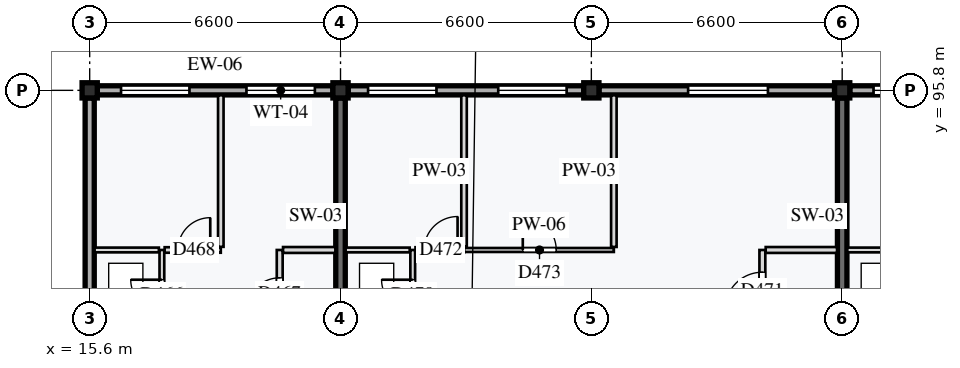
"""IFC4 building model, lengths in metres.
Left out: names, types, materials, properties, quantities, classifications, styles, units other than length and angle.
Written with IfcOpenShell. Run it as: python <this file> out.ifc"""

import sys

from ifc_helpers import new_model, si_unit, direction, frame, frame_2d, origin, origin_2d, place, context, subcontext, project, spatial, rectangle, extrude, element, fill, save


model = new_model("IFC4")
c1 = context("Model", 3, precision=1e-05, world=origin(), true_north=direction((0.0, 1.0)))
c2 = subcontext(c1, "Body", "Model", "MODEL_VIEW")
j1 = project(units=[si_unit("LENGTHUNIT", "METRE"), si_unit("PLANEANGLEUNIT", "RADIAN")], contexts=[c1])
p1 = place(None, origin())
s1 = spatial("IfcSite", under=j1, at=p1, CompositionType="ELEMENT")
p2 = place(p1, origin())
s2 = spatial("IfcBuilding", under=s1, at=p2, CompositionType="ELEMENT")
p3 = place(p2, frame((0.0, 0.0, 46.8)))
s3 = spatial("IfcBuildingStorey", under=s2, at=p3, CompositionType="ELEMENT", Elevation=46.8)
for number, where, z_axis, x_axis in (
    (1, (15.6, 95.8, 0.0), (0.0, 0.0, 1.0), (1.0, 0.0, 0.0)),
    (2, (22.2, 95.8, 0.0), (0.0, 0.0, 1.0), (1.0, 0.0, 0.0)),
    (3, (28.8, 95.8, 0.0), (0.0, 0.0, 1.0), (1.0, 0.0, 0.0)),
    (4, (35.4, 95.8, 0.0), (0.0, 0.0, 1.0), (1.0, 0.0, 0.0)),
):
    element("IfcColumn", number, at=place(p3, frame(where, z_axis=z_axis, x_axis=x_axis)), inside=s3, PredefinedType="COLUMN", context=c2, shape_type="SweptSolid", body=[
        extrude(rectangle(XDim=0.4, YDim=0.4, at=origin_2d()), origin(), (0.0, 0.0, 1.0), 3.2),
    ])
for number, where, z_axis, x_axis in (
    (5, (22.2, 89.4, 0.0), (0.0, 0.0, 1.0), (0.0, 1.0, 0.0)),
    (6, (35.4, 89.4, 0.0), (0.0, 0.0, 1.0), (0.0, 1.0, 0.0)),
):
    element("IfcWall", number, at=place(p3, frame(where, z_axis=z_axis, x_axis=x_axis)), inside=s3, PredefinedType="SHEAR", context=c2, shape_type="SweptSolid", body=[
        extrude(rectangle(XDim=6.2, YDim=0.25, at=frame_2d((3.1, 0.0))), origin(), (0.0, 0.0, 1.0), 2.98),
    ])
p4 = place(p3, frame((15.8, 95.8, 0.0), z_axis=(0.0, 0.0, 1.0), x_axis=(1.0, 0.0, 0.0)))
e7 = element("IfcWall", 7, at=p4, inside=s3, PredefinedType="STANDARD", context=c2, shape_type="SweptSolid", body=[
    extrude(rectangle(XDim=6.2, YDim=0.24, at=frame_2d((3.1, 0.0))), origin(), (0.0, 0.0, 1.0), 2.65),
])
p5 = place(p4, frame((0.625, 0.0, 0.85)))
e8 = element("IfcOpeningElement", 8, at=p5, cuts=e7, PredefinedType="OPENING", context=c2, shape_type="SweptSolid", body=[
    extrude(rectangle(XDim=1.8, YDim=1.35, at=frame_2d((0.9, 0.675))), frame((0.0, 0.13, 0.0), z_axis=(0.0, -1.0, 0.0), x_axis=(1.0, 0.0, 0.0)), (0.0, 0.0, 1.0), 0.26),
])
p6 = place(p4, frame((3.925, 0.0, 0.85)))
e9 = element("IfcOpeningElement", 9, at=p6, cuts=e7, PredefinedType="OPENING", context=c2, shape_type="SweptSolid", body=[
    extrude(rectangle(XDim=1.8, YDim=1.55, at=frame_2d((0.9, 0.775))), frame((0.0, 0.13, 0.0), z_axis=(0.0, -1.0, 0.0), x_axis=(1.0, 0.0, 0.0)), (0.0, 0.0, 1.0), 0.26),
])
p7 = place(p3, frame((22.4, 95.8, 0.0), z_axis=(0.0, 0.0, 1.0), x_axis=(1.0, 0.0, 0.0)))
e10 = element("IfcWall", 10, at=p7, inside=s3, PredefinedType="STANDARD", context=c2, shape_type="SweptSolid", body=[
    extrude(rectangle(XDim=6.2, YDim=0.24, at=frame_2d((3.1, 0.0))), origin(), (0.0, 0.0, 1.0), 2.65),
])
p8 = place(p7, frame((0.525, 0.0, 0.85)))
e11 = element("IfcOpeningElement", 11, at=p8, cuts=e10, PredefinedType="OPENING", context=c2, shape_type="SweptSolid", body=[
    extrude(rectangle(XDim=1.8, YDim=1.35, at=frame_2d((0.9, 0.675))), frame((0.0, 0.13, 0.0), z_axis=(0.0, -1.0, 0.0), x_axis=(1.0, 0.0, 0.0)), (0.0, 0.0, 1.0), 0.26),
])
p9 = place(p7, frame((3.95, 0.0, 0.85)))
e12 = element("IfcOpeningElement", 12, at=p9, cuts=e10, PredefinedType="OPENING", context=c2, shape_type="SweptSolid", body=[
    extrude(rectangle(XDim=1.8, YDim=1.35, at=frame_2d((0.9, 0.675))), frame((0.0, 0.13, 0.0), z_axis=(0.0, -1.0, 0.0), x_axis=(1.0, 0.0, 0.0)), (0.0, 0.0, 1.0), 0.26),
])
p10 = place(p3, frame((29.0, 95.8, 0.0), z_axis=(0.0, 0.0, 1.0), x_axis=(1.0, 0.0, 0.0)))
e13 = element("IfcWall", 13, at=p10, inside=s3, PredefinedType="STANDARD", context=c2, shape_type="SweptSolid", body=[
    extrude(rectangle(XDim=6.2, YDim=0.24, at=frame_2d((3.1, 0.0))), origin(), (0.0, 0.0, 1.0), 2.65),
])
p11 = place(p10, frame((2.346, 0.0, 0.85)))
e14 = element("IfcOpeningElement", 14, at=p11, cuts=e13, PredefinedType="OPENING", context=c2, shape_type="SweptSolid", body=[
    extrude(rectangle(XDim=2.1, YDim=1.55, at=frame_2d((1.05, 0.775))), frame((0.0, 0.13, 0.0), z_axis=(0.0, -1.0, 0.0), x_axis=(1.0, 0.0, 0.0)), (0.0, 0.0, 1.0), 0.26),
])
p12 = place(p3, frame((35.6, 95.8, 0.0), z_axis=(0.0, 0.0, 1.0), x_axis=(1.0, 0.0, 0.0)))
e15 = element("IfcWall", 15, at=p12, inside=s3, PredefinedType="STANDARD", context=c2, shape_type="SweptSolid", body=[
    extrude(rectangle(XDim=6.2, YDim=0.24, at=frame_2d((3.1, 0.0))), origin(), (0.0, 0.0, 1.0), 2.65),
])
p13 = place(p12, frame((0.625, 0.0, 0.85)))
e16 = element("IfcOpeningElement", 16, at=p13, cuts=e15, PredefinedType="OPENING", context=c2, shape_type="SweptSolid", body=[
    extrude(rectangle(XDim=1.8, YDim=1.35, at=frame_2d((0.9, 0.675))), frame((0.0, 0.13, 0.0), z_axis=(0.0, -1.0, 0.0), x_axis=(1.0, 0.0, 0.0)), (0.0, 0.0, 1.0), 0.26),
])
p14 = place(p3, frame((15.6, 89.4, 0.0), z_axis=(0.0, 0.0, 1.0), x_axis=(0.0, 1.0, 0.0)))
e17 = element("IfcWall", 17, at=p14, inside=s3, PredefinedType="STANDARD", context=c2, shape_type="SweptSolid", body=[
    extrude(rectangle(XDim=6.2, YDim=0.24, at=frame_2d((3.1, 0.0))), origin(), (0.0, 0.0, 1.0), 2.65),
])
p15 = place(p3, frame((17.5, 89.298, 0.0), z_axis=(0.0, 0.0, 1.0), x_axis=(0.0, 1.0, 0.0)))
e18 = element("IfcWall", 18, at=p15, inside=s3, PredefinedType="PARTITIONING", context=c2, shape_type="SweptSolid", body=[
    extrude(rectangle(XDim=2.302, YDim=0.125, at=frame_2d((1.151, 0.0))), origin(), (0.0, 0.0, 1.0), 2.98),
])
p16 = place(p15, frame((0.7, 0.0, 0.0)))
e19 = element("IfcOpeningElement", 19, at=p16, cuts=e18, PredefinedType="OPENING", context=c2, shape_type="SweptSolid", body=[
    extrude(rectangle(XDim=0.82, YDim=2.05, at=frame_2d((0.41, 1.025))), frame((0.0, 0.073, 0.0), z_axis=(0.0, -1.0, 0.0), x_axis=(1.0, 0.0, 0.0)), (0.0, 0.0, 1.0), 0.145),
])
p17 = place(p3, frame((15.73, 91.6, 0.0), z_axis=(0.0, 0.0, 1.0), x_axis=(1.0, 0.0, 0.0)))
e20 = element("IfcWall", 20, at=p17, inside=s3, PredefinedType="PARTITIONING", context=c2, shape_type="SweptSolid", body=[
    extrude(rectangle(XDim=1.69, YDim=0.125, at=frame_2d((0.845, 0.0))), origin(), (0.0, 0.0, 1.0), 2.98),
])
p18 = place(p3, frame((20.6, 89.298, 0.0), z_axis=(0.0, 0.0, 1.0), x_axis=(0.0, 1.0, 0.0)))
e21 = element("IfcWall", 21, at=p18, inside=s3, PredefinedType="PARTITIONING", context=c2, shape_type="SweptSolid", body=[
    extrude(rectangle(XDim=2.302, YDim=0.155, at=frame_2d((1.151, 0.0))), origin(), (0.0, 0.0, 1.0), 2.98),
])
p19 = place(p18, frame((0.7, 0.0, 0.0)))
e22 = element("IfcOpeningElement", 22, at=p19, cuts=e21, PredefinedType="OPENING", context=c2, shape_type="SweptSolid", body=[
    extrude(rectangle(XDim=0.87, YDim=2.08, at=frame_2d((0.435, 1.04))), frame((0.0, 0.087, 0.0), z_axis=(0.0, -1.0, 0.0), x_axis=(1.0, 0.0, 0.0)), (0.0, 0.0, 1.0), 0.175),
])
p20 = place(p3, frame((20.688, 91.6, 0.0), z_axis=(0.0, 0.0, 1.0), x_axis=(1.0, 0.0, 0.0)))
e23 = element("IfcWall", 23, at=p20, inside=s3, PredefinedType="PARTITIONING", context=c2, shape_type="SweptSolid", body=[
    extrude(rectangle(XDim=1.377, YDim=0.155, at=frame_2d((0.689, 0.0))), origin(), (0.0, 0.0, 1.0), 2.98),
])
p21 = place(p3, frame((17.573, 91.6, 0.0), z_axis=(0.0, 0.0, 1.0), x_axis=(1.0, 0.0, 0.0)))
e24 = element("IfcWall", 24, at=p21, inside=s3, PredefinedType="PARTITIONING", context=c2, shape_type="SweptSolid", body=[
    extrude(rectangle(XDim=1.478, YDim=0.145, at=frame_2d((0.739, 0.0))), origin(), (0.0, 0.0, 1.0), 2.98),
])
p22 = place(p21, frame((0.35, 0.0, 0.0)))
e25 = element("IfcOpeningElement", 25, at=p22, cuts=e24, PredefinedType="OPENING", context=c2, shape_type="SweptSolid", body=[
    extrude(rectangle(XDim=0.85, YDim=2.1, at=frame_2d((0.425, 1.05))), frame((0.0, 0.083, 0.0), z_axis=(0.0, -1.0, 0.0), x_axis=(1.0, 0.0, 0.0)), (0.0, 0.0, 1.0), 0.165),
])
p23 = place(p3, frame((19.05, 91.683, 0.0), z_axis=(0.0, 0.0, 1.0), x_axis=(0.0, 1.0, 0.0)))
e26 = element("IfcWall", 26, at=p23, inside=s3, PredefinedType="PARTITIONING", context=c2, shape_type="SweptSolid", body=[
    extrude(rectangle(XDim=3.987, YDim=0.145, at=frame_2d((1.994, 0.0))), origin(), (0.0, 0.0, 1.0), 2.98),
])
p24 = place(p3, frame((24.1, 89.298, 0.0), z_axis=(0.0, 0.0, 1.0), x_axis=(0.0, 1.0, 0.0)))
e27 = element("IfcWall", 27, at=p24, inside=s3, PredefinedType="PARTITIONING", context=c2, shape_type="SweptSolid", body=[
    extrude(rectangle(XDim=2.302, YDim=0.125, at=frame_2d((1.151, 0.0))), origin(), (0.0, 0.0, 1.0), 2.98),
])
p25 = place(p24, frame((0.7, 0.0, 0.0)))
e28 = element("IfcOpeningElement", 28, at=p25, cuts=e27, PredefinedType="OPENING", context=c2, shape_type="SweptSolid", body=[
    extrude(rectangle(XDim=0.82, YDim=2.05, at=frame_2d((0.41, 1.025))), frame((0.0, 0.073, 0.0), z_axis=(0.0, -1.0, 0.0), x_axis=(1.0, 0.0, 0.0)), (0.0, 0.0, 1.0), 0.145),
])
p26 = place(p3, frame((22.335, 91.6, 0.0), z_axis=(0.0, 0.0, 1.0), x_axis=(1.0, 0.0, 0.0)))
e29 = element("IfcWall", 29, at=p26, inside=s3, PredefinedType="PARTITIONING", context=c2, shape_type="SweptSolid", body=[
    extrude(rectangle(XDim=1.685, YDim=0.125, at=frame_2d((0.843, 0.0))), origin(), (0.0, 0.0, 1.0), 2.98),
])
p27 = place(p3, frame((33.3, 89.335, 0.0), z_axis=(0.0, 0.0, 1.0), x_axis=(0.0, 1.0, 0.0)))
e30 = element("IfcWall", 30, at=p27, inside=s3, PredefinedType="PARTITIONING", context=c2, shape_type="SweptSolid", body=[
    extrude(rectangle(XDim=2.265, YDim=0.155, at=frame_2d((1.133, 0.0))), origin(), (0.0, 0.0, 1.0), 2.98),
])
p28 = place(p27, frame((0.7, 0.0, 0.0)))
e31 = element("IfcOpeningElement", 31, at=p28, cuts=e30, PredefinedType="OPENING", context=c2, shape_type="SweptSolid", body=[
    extrude(rectangle(XDim=0.98, YDim=2.12, at=frame_2d((0.49, 1.06))), frame((0.0, 0.087, 0.0), z_axis=(0.0, -1.0, 0.0), x_axis=(1.0, 0.0, 0.0)), (0.0, 0.0, 1.0), 0.175),
])
p29 = place(p3, frame((33.387, 91.6, 0.0), z_axis=(0.0, 0.0, 1.0), x_axis=(1.0, 0.0, 0.0)))
e32 = element("IfcWall", 32, at=p29, inside=s3, PredefinedType="PARTITIONING", context=c2, shape_type="SweptSolid", body=[
    extrude(rectangle(XDim=1.877, YDim=0.155, at=frame_2d((0.939, 0.0))), origin(), (0.0, 0.0, 1.0), 2.98),
])
p30 = place(p3, frame((24.173, 91.6, 0.0), z_axis=(0.0, 0.0, 1.0), x_axis=(1.0, 0.0, 0.0)))
e33 = element("IfcWall", 33, at=p30, inside=s3, PredefinedType="PARTITIONING", context=c2, shape_type="SweptSolid", body=[
    extrude(rectangle(XDim=1.277, YDim=0.145, at=frame_2d((0.639, 0.0))), origin(), (0.0, 0.0, 1.0), 2.98),
])
p31 = place(p30, frame((0.228, 0.0, 0.0)))
e34 = element("IfcOpeningElement", 34, at=p31, cuts=e33, PredefinedType="OPENING", context=c2, shape_type="SweptSolid", body=[
    extrude(rectangle(XDim=0.88, YDim=2.1, at=frame_2d((0.44, 1.05))), frame((0.0, 0.083, 0.0), z_axis=(0.0, -1.0, 0.0), x_axis=(1.0, 0.0, 0.0)), (0.0, 0.0, 1.0), 0.165),
])
p32 = place(p3, frame((25.45, 91.683, 0.0), z_axis=(0.0, 0.0, 1.0), x_axis=(0.0, 1.0, 0.0)))
e35 = element("IfcWall", 35, at=p32, inside=s3, PredefinedType="PARTITIONING", context=c2, shape_type="SweptSolid", body=[
    extrude(rectangle(XDim=3.987, YDim=0.145, at=frame_2d((1.994, 0.0))), origin(), (0.0, 0.0, 1.0), 2.98),
])
p33 = place(p3, frame((25.45, 91.6, 0.0), z_axis=(0.0, 0.0, 1.0), x_axis=(1.0, 0.0, 0.0)))
e36 = element("IfcWall", 36, at=p33, inside=s3, PredefinedType="PARTITIONING", context=c2, shape_type="SweptSolid", body=[
    extrude(rectangle(XDim=3.942, YDim=0.105, at=frame_2d((1.971, 0.0))), origin(), (0.0, 0.0, 1.0), 2.98),
])
p34 = place(p33, frame((1.546, 0.0, 0.0)))
e37 = element("IfcOpeningElement", 37, at=p34, cuts=e36, PredefinedType="OPENING", context=c2, shape_type="SweptSolid", body=[
    extrude(rectangle(XDim=0.88, YDim=2.16, at=frame_2d((0.44, 1.08))), frame((0.0, 0.062, 0.0), z_axis=(0.0, -1.0, 0.0), x_axis=(1.0, 0.0, 0.0)), (0.0, 0.0, 1.0), 0.125),
])
p35 = place(p3, frame((29.392, 91.68, 0.0), z_axis=(0.0, 0.0, 1.0), x_axis=(0.0, 1.0, 0.0)))
e38 = element("IfcWall", 38, at=p35, inside=s3, PredefinedType="PARTITIONING", context=c2, shape_type="SweptSolid", body=[
    extrude(rectangle(XDim=3.99, YDim=0.145, at=frame_2d((1.995, 0.0))), origin(), (0.0, 0.0, 1.0), 2.98),
])
p36 = place(p3, frame((35.535, 91.6, 0.0), z_axis=(0.0, 0.0, 1.0), x_axis=(1.0, 0.0, 0.0)))
e39 = element("IfcWall", 39, at=p36, inside=s3, PredefinedType="PARTITIONING", context=c2, shape_type="SweptSolid", body=[
    extrude(rectangle(XDim=1.685, YDim=0.125, at=frame_2d((0.843, 0.0))), origin(), (0.0, 0.0, 1.0), 2.98),
])
p37 = place(p5, origin())
e40 = element("IfcWindow", 40, at=p37, inside=s3, PartitioningType="SINGLE_PANEL", PredefinedType="WINDOW", context=c2, shape_type="SweptSolid", body=[
    extrude(rectangle(XDim=1.8, YDim=1.35, at=frame_2d((0.9, 0.675))), frame((0.0, 0.03, 0.0), z_axis=(0.0, -1.0, 0.0), x_axis=(1.0, 0.0, 0.0)), (0.0, 0.0, 1.0), 0.06),
])
fill(e8, e40)
p38 = place(p6, origin())
e41 = element("IfcWindow", 41, at=p38, inside=s3, PartitioningType="SINGLE_PANEL", PredefinedType="WINDOW", context=c2, shape_type="SweptSolid", body=[
    extrude(rectangle(XDim=1.8, YDim=1.55, at=frame_2d((0.9, 0.775))), frame((0.0, 0.03, 0.0), z_axis=(0.0, -1.0, 0.0), x_axis=(1.0, 0.0, 0.0)), (0.0, 0.0, 1.0), 0.06),
])
fill(e9, e41)
p39 = place(p8, origin())
e42 = element("IfcWindow", 42, at=p39, inside=s3, PartitioningType="SINGLE_PANEL", PredefinedType="WINDOW", context=c2, shape_type="SweptSolid", body=[
    extrude(rectangle(XDim=1.8, YDim=1.35, at=frame_2d((0.9, 0.675))), frame((0.0, 0.03, 0.0), z_axis=(0.0, -1.0, 0.0), x_axis=(1.0, 0.0, 0.0)), (0.0, 0.0, 1.0), 0.06),
])
fill(e11, e42)
p40 = place(p9, origin())
e43 = element("IfcWindow", 43, at=p40, inside=s3, PartitioningType="SINGLE_PANEL", PredefinedType="WINDOW", context=c2, shape_type="SweptSolid", body=[
    extrude(rectangle(XDim=1.8, YDim=1.35, at=frame_2d((0.9, 0.675))), frame((0.0, 0.03, 0.0), z_axis=(0.0, -1.0, 0.0), x_axis=(1.0, 0.0, 0.0)), (0.0, 0.0, 1.0), 0.06),
])
fill(e12, e43)
p41 = place(p11, origin())
e44 = element("IfcWindow", 44, at=p41, inside=s3, PartitioningType="SINGLE_PANEL", PredefinedType="WINDOW", context=c2, shape_type="SweptSolid", body=[
    extrude(rectangle(XDim=2.1, YDim=1.55, at=frame_2d((1.05, 0.775))), frame((0.0, 0.03, 0.0), z_axis=(0.0, -1.0, 0.0), x_axis=(1.0, 0.0, 0.0)), (0.0, 0.0, 1.0), 0.06),
])
fill(e14, e44)
p42 = place(p13, origin())
e45 = element("IfcWindow", 45, at=p42, inside=s3, PartitioningType="SINGLE_PANEL", PredefinedType="WINDOW", context=c2, shape_type="SweptSolid", body=[
    extrude(rectangle(XDim=1.8, YDim=1.35, at=frame_2d((0.9, 0.675))), frame((0.0, 0.03, 0.0), z_axis=(0.0, -1.0, 0.0), x_axis=(1.0, 0.0, 0.0)), (0.0, 0.0, 1.0), 0.06),
])
fill(e16, e45)
p43 = place(p16, origin())
e46 = element("IfcDoor", 46, at=p43, inside=s3, OperationType="SINGLE_SWING_RIGHT", PredefinedType="DOOR", context=c2, shape_type="SweptSolid", body=[
    extrude(rectangle(XDim=0.82, YDim=2.05, at=frame_2d((0.41, 1.025))), frame((0.0, 0.025, 0.0), z_axis=(0.0, -1.0, 0.0), x_axis=(1.0, 0.0, 0.0)), (0.0, 0.0, 1.0), 0.05),
])
fill(e19, e46)
p44 = place(p19, origin())
e47 = element("IfcDoor", 47, at=p44, inside=s3, OperationType="SINGLE_SWING_LEFT", PredefinedType="DOOR", context=c2, shape_type="SweptSolid", body=[
    extrude(rectangle(XDim=0.87, YDim=2.08, at=frame_2d((0.435, 1.04))), frame((0.0, 0.025, 0.0), z_axis=(0.0, -1.0, 0.0), x_axis=(1.0, 0.0, 0.0)), (0.0, 0.0, 1.0), 0.05),
])
fill(e22, e47)
p45 = place(p22, origin())
e48 = element("IfcDoor", 48, at=p45, inside=s3, OperationType="SINGLE_SWING_RIGHT", PredefinedType="DOOR", context=c2, shape_type="SweptSolid", body=[
    extrude(rectangle(XDim=0.85, YDim=2.1, at=frame_2d((0.425, 1.05))), frame((0.0, 0.025, 0.0), z_axis=(0.0, -1.0, 0.0), x_axis=(1.0, 0.0, 0.0)), (0.0, 0.0, 1.0), 0.05),
])
fill(e25, e48)
p46 = place(p25, origin())
e49 = element("IfcDoor", 49, at=p46, inside=s3, OperationType="SINGLE_SWING_RIGHT", PredefinedType="DOOR", context=c2, shape_type="SweptSolid", body=[
    extrude(rectangle(XDim=0.82, YDim=2.05, at=frame_2d((0.41, 1.025))), frame((0.0, 0.025, 0.0), z_axis=(0.0, -1.0, 0.0), x_axis=(1.0, 0.0, 0.0)), (0.0, 0.0, 1.0), 0.05),
])
fill(e28, e49)
p47 = place(p28, origin())
e50 = element("IfcDoor", 50, at=p47, inside=s3, OperationType="SINGLE_SWING_LEFT", PredefinedType="DOOR", context=c2, shape_type="SweptSolid", body=[
    extrude(rectangle(XDim=0.98, YDim=2.12, at=frame_2d((0.49, 1.06))), frame((0.0, 0.025, 0.0), z_axis=(0.0, -1.0, 0.0), x_axis=(1.0, 0.0, 0.0)), (0.0, 0.0, 1.0), 0.05),
])
fill(e31, e50)
p48 = place(p31, origin())
e51 = element("IfcDoor", 51, at=p48, inside=s3, OperationType="SINGLE_SWING_RIGHT", PredefinedType="DOOR", context=c2, shape_type="SweptSolid", body=[
    extrude(rectangle(XDim=0.88, YDim=2.1, at=frame_2d((0.44, 1.05))), frame((0.0, 0.025, 0.0), z_axis=(0.0, -1.0, 0.0), x_axis=(1.0, 0.0, 0.0)), (0.0, 0.0, 1.0), 0.05),
])
fill(e34, e51)
p49 = place(p34, origin())
e52 = element("IfcDoor", 52, at=p49, inside=s3, OperationType="SINGLE_SWING_LEFT", PredefinedType="DOOR", context=c2, shape_type="SweptSolid", body=[
    extrude(rectangle(XDim=0.88, YDim=2.16, at=frame_2d((0.44, 1.08))), frame((0.0, 0.025, 0.0), z_axis=(0.0, -1.0, 0.0), x_axis=(1.0, 0.0, 0.0)), (0.0, 0.0, 1.0), 0.05),
])
fill(e37, e52)
save(model, sys.argv[1])
